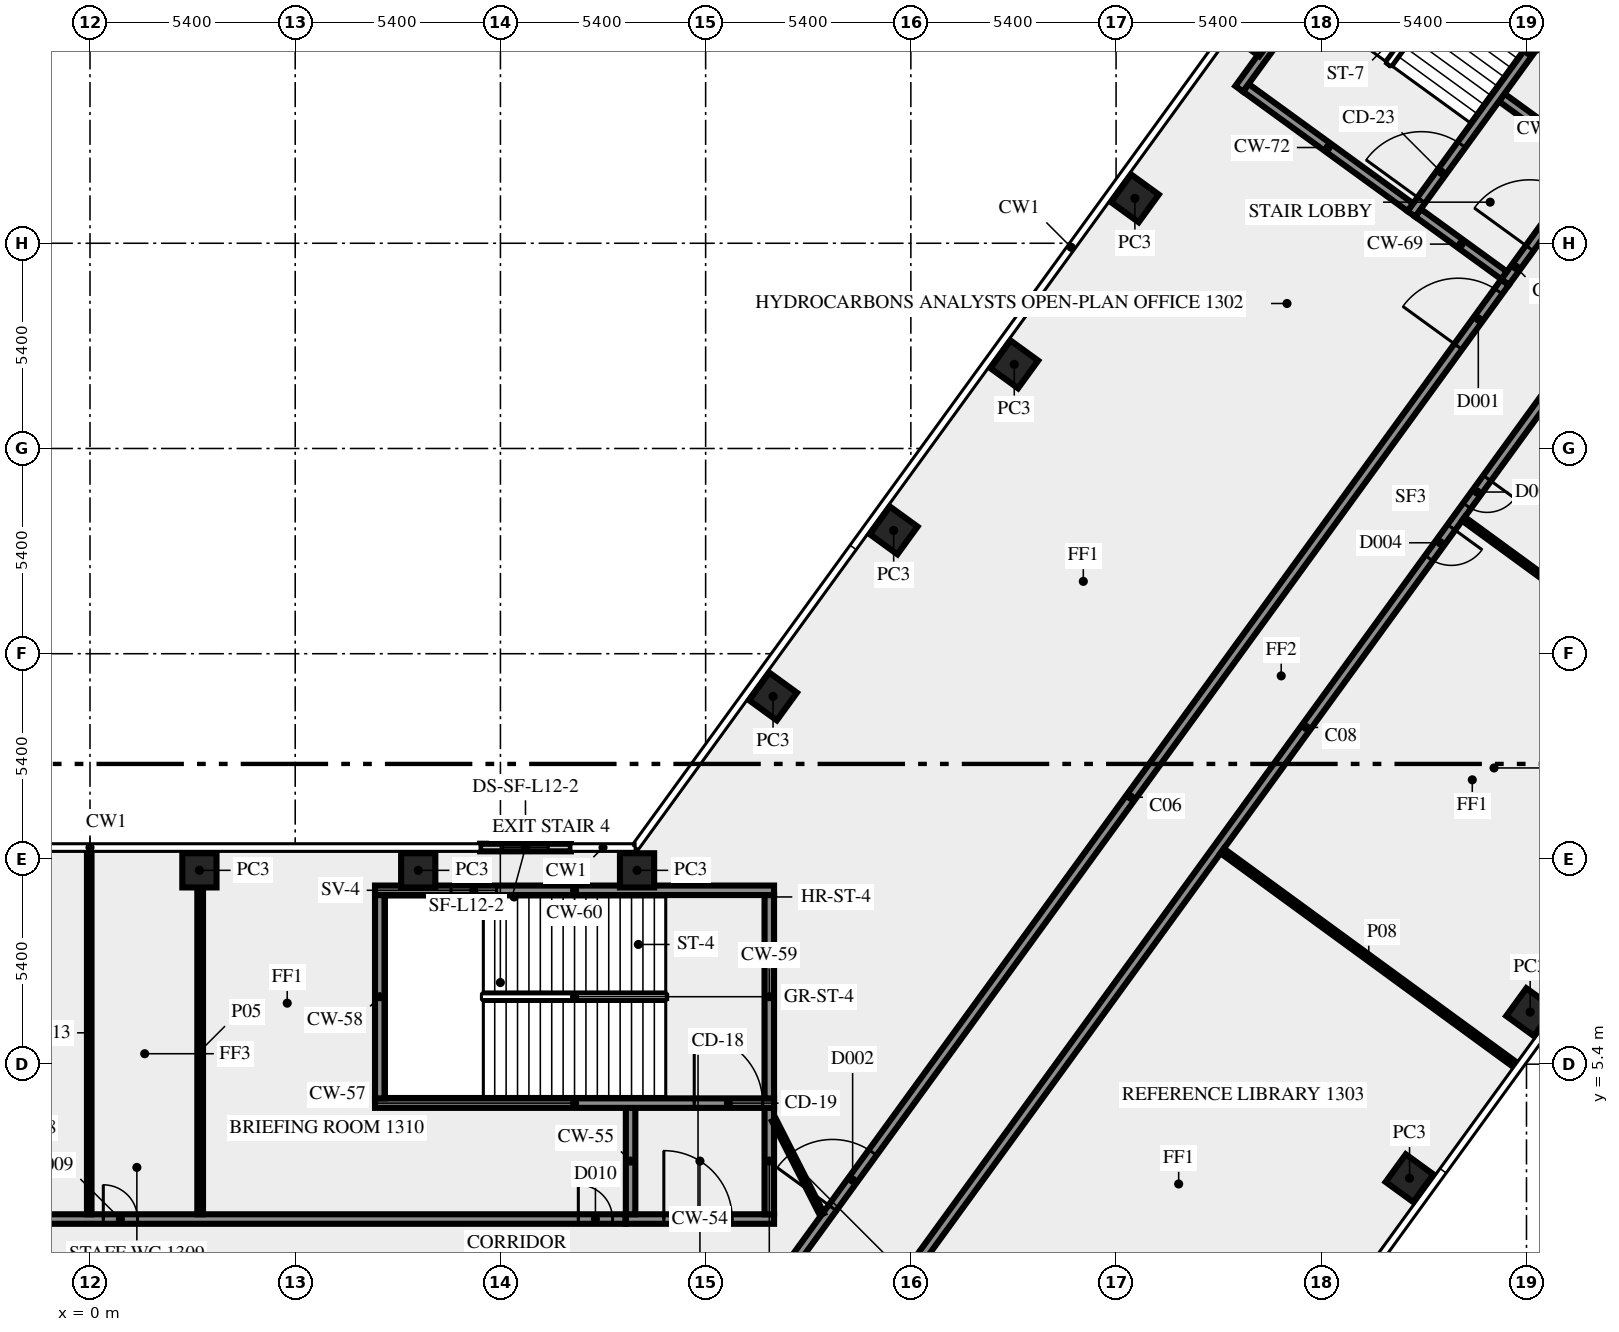
"""IFC4 building model, lengths in metres.
Left out: names, types, materials, properties, quantities, classifications, styles, units other than length and angle.
Written with IfcOpenShell. Run it as: python <this file> out.ifc"""

import sys

from ifc_helpers import new_model, si_unit, direction, frame, frame_2d, origin, origin_2d, place, context, subcontext, project, spatial, rectangle, extrude, element, fill, save


model = new_model("IFC4")
c1 = context("Model", 3, precision=1e-05, world=origin(), true_north=direction((0.0, 1.0)))
c2 = subcontext(c1, "Body", "Model", "MODEL_VIEW")
j1 = project(units=[si_unit("LENGTHUNIT", "METRE"), si_unit("PLANEANGLEUNIT", "RADIAN")], contexts=[c1])
p1 = place(None, origin())
s1 = spatial("IfcSite", under=j1, at=p1, CompositionType="ELEMENT")
p2 = place(p1, origin())
s2 = spatial("IfcBuilding", under=s1, at=p2, CompositionType="ELEMENT")
p3 = place(p2, frame((0.0, 0.0, 59.0)))
s3 = spatial("IfcBuildingStorey", under=s2, at=p3, CompositionType="ELEMENT", Elevation=59.0)
for number, where, z_axis, x_axis in (
    (1, (34.722, 2.4, 0.0), (0.0, 0.0, 1.0), (0.588, 0.809, 0.0)),
    (2, (37.896, 6.769, 0.0), (0.0, 0.0, 1.0), (0.588, 0.809, 0.0)),
    (3, (30.669, 32.55, 0.0), (0.0, 0.0, 1.0), (-0.588, -0.809, 0.0)),
    (4, (27.495, 28.181, 0.0), (0.0, 0.0, 1.0), (-0.588, -0.809, 0.0)),
    (5, (24.321, 23.812, 0.0), (0.0, 0.0, 1.0), (-0.588, -0.809, 0.0)),
    (6, (21.147, 19.444, 0.0), (0.0, 0.0, 1.0), (-0.588, -0.809, 0.0)),
    (7, (17.974, 15.075, 0.0), (0.0, 0.0, 1.0), (-0.588, -0.809, 0.0)),
    (8, (14.395, 10.5, 0.0), (0.0, 0.0, 1.0), (-1.0, 0.0, 0.0)),
    (9, (8.637, 10.5, 0.0), (0.0, 0.0, 1.0), (-1.0, 0.0, 0.0)),
    (10, (2.879, 10.5, 0.0), (0.0, 0.0, 1.0), (-1.0, 0.0, 0.0)),
):
    element("IfcColumn", number, at=place(p3, frame(where, z_axis=z_axis, x_axis=x_axis)), inside=s3, PredefinedType="COLUMN", context=c2, shape_type="SweptSolid", body=[
        extrude(rectangle(XDim=0.9, YDim=0.9, at=origin_2d()), origin(), (0.0, 0.0, 1.0), 3.65),
    ])
p4 = place(p3, frame((12.655, 11.1, 0.0), z_axis=(0.0, 0.0, 1.0), x_axis=(-1.0, 0.0, 0.0)))
e11 = element("IfcWall", 11, at=p4, inside=s3, PredefinedType="SOLIDWALL", context=c2, shape_type="SweptSolid", body=[
    extrude(rectangle(XDim=2.392, YDim=0.2, at=frame_2d((1.196, 0.0))), origin(), (0.0, 0.0, 1.0), 3.65),
])
p5 = place(p4, frame((0.596, 0.0, 1.0)))
e12 = element("IfcOpeningElement", 12, at=p5, cuts=e11, PredefinedType="OPENING", context=c2, shape_type="SweptSolid", body=[
    extrude(rectangle(XDim=1.2, YDim=1.2, at=frame_2d((0.6, 0.6))), frame((0.0, 0.11, 0.0), z_axis=(0.0, -1.0, 0.0), x_axis=(1.0, 0.0, 0.0)), (0.0, 0.0, 1.0), 0.22),
])
p6 = place(p3, frame((14.1, 1.325, 0.0), z_axis=(0.0, 0.0, 1.0), x_axis=(1.0, 0.0, 0.0)))
e13 = element("IfcWall", 13, at=p6, inside=s3, PredefinedType="SHEAR", context=c2, shape_type="SweptSolid", body=[
    extrude(rectangle(XDim=3.9, YDim=0.25, at=frame_2d((1.95, 0.0))), origin(), (0.0, 0.0, 1.0), 3.65),
])
p7 = place(p6, frame((1.0, 0.0, 0.0)))
e14 = element("IfcOpeningElement", 14, at=p7, cuts=e13, PredefinedType="OPENING", context=c2, shape_type="SweptSolid", body=[
    extrude(rectangle(XDim=1.8, YDim=2.1, at=frame_2d((0.9, 1.05))), frame((0.0, 0.135, 0.0), z_axis=(0.0, -1.0, 0.0), x_axis=(1.0, 0.0, 0.0)), (0.0, 0.0, 1.0), 0.27),
])
for number, where, z_axis, x_axis in (
    (15, (14.225, 1.45, 0.0), (0.0, 0.0, 1.0), (0.0, 1.0, 0.0)),
    (16, (17.875, 1.45, 0.0), (0.0, 0.0, 1.0), (0.0, 1.0, 0.0)),
):
    element("IfcWall", number, at=place(p3, frame(where, z_axis=z_axis, x_axis=x_axis)), inside=s3, PredefinedType="SHEAR", context=c2, shape_type="SweptSolid", body=[
        extrude(rectangle(XDim=2.8, YDim=0.25, at=frame_2d((1.4, 0.0))), origin(), (0.0, 0.0, 1.0), 3.65),
    ])
p8 = place(p3, frame((7.5, 4.375, 0.0), z_axis=(0.0, 0.0, 1.0), x_axis=(1.0, 0.0, 0.0)))
e17 = element("IfcWall", 17, at=p8, inside=s3, PredefinedType="SHEAR", context=c2, shape_type="SweptSolid", body=[
    extrude(rectangle(XDim=10.5, YDim=0.25, at=frame_2d((5.25, 0.0))), origin(), (0.0, 0.0, 1.0), 3.65),
])
p9 = place(p8, frame((8.4, 0.0, 0.0)))
e18 = element("IfcOpeningElement", 18, at=p9, cuts=e17, PredefinedType="OPENING", context=c2, shape_type="SweptSolid", body=[
    extrude(rectangle(XDim=1.8, YDim=2.1, at=frame_2d((0.9, 1.05))), frame((0.0, 0.135, 0.0), z_axis=(0.0, -1.0, 0.0), x_axis=(1.0, 0.0, 0.0)), (0.0, 0.0, 1.0), 0.27),
])
for number, where, z_axis, x_axis in (
    (19, (7.625, 4.5, 0.0), (0.0, 0.0, 1.0), (0.0, 1.0, 0.0)),
    (20, (17.875, 4.5, 0.0), (0.0, 0.0, 1.0), (0.0, 1.0, 0.0)),
):
    element("IfcWall", number, at=place(p3, frame(where, z_axis=z_axis, x_axis=x_axis)), inside=s3, PredefinedType="SHEAR", context=c2, shape_type="SweptSolid", body=[
        extrude(rectangle(XDim=5.35, YDim=0.25, at=frame_2d((2.675, 0.0))), origin(), (0.0, 0.0, 1.0), 3.65),
    ])
p10 = place(p3, frame((7.5, 9.975, 0.0), z_axis=(0.0, 0.0, 1.0), x_axis=(1.0, 0.0, 0.0)))
e21 = element("IfcWall", 21, at=p10, inside=s3, PredefinedType="SHEAR", context=c2, shape_type="SweptSolid", body=[
    extrude(rectangle(XDim=10.5, YDim=0.25, at=frame_2d((5.25, 0.0))), origin(), (0.0, 0.0, 1.0), 3.65),
])
p11 = place(p10, frame((2.0, 0.0, 1.0)))
e22 = element("IfcOpeningElement", 22, at=p11, cuts=e21, PredefinedType="OPENING", context=c2, shape_type="SweptSolid", body=[
    extrude(rectangle(XDim=1.2, YDim=1.2, at=frame_2d((0.6, 0.6))), frame((0.0, 0.135, 0.0), z_axis=(0.0, -1.0, 0.0), x_axis=(1.0, 0.0, 0.0)), (0.0, 0.0, 1.0), 0.27),
])
p12 = place(p3, frame((37.238, 25.98, 0.0), z_axis=(0.0, 0.0, 1.0), x_axis=(0.587772420479, 0.809026317077, 0.0)))
e23 = element("IfcWall", 23, at=p12, inside=s3, PredefinedType="SHEAR", context=c2, shape_type="SweptSolid", body=[
    extrude(rectangle(XDim=4.0, YDim=0.25, at=frame_2d((2.0, 0.0))), origin(), (0.0, 0.0, 1.0), 3.65),
])
p13 = place(p12, frame((1.1, 0.0, 0.0)))
e24 = element("IfcOpeningElement", 24, at=p13, cuts=e23, PredefinedType="OPENING", context=c2, shape_type="SweptSolid", body=[
    extrude(rectangle(XDim=1.8, YDim=2.1, at=frame_2d((0.9, 1.05))), frame((0.0, 0.135, 0.0), z_axis=(0.0, -1.0, 0.0), x_axis=(1.0, 0.0, 0.0)), (0.0, 0.0, 1.0), 0.27),
])
for number, where, z_axis, x_axis in (
    (25, (37.21, 26.154, 0.0), (0.0, 0.0, 1.0), (-0.809, 0.588, 0.0)),
    (26, (39.414, 29.188, 0.0), (0.0, 0.0, 1.0), (-0.809, 0.588, 0.0)),
):
    element("IfcWall", number, at=place(p3, frame(where, z_axis=z_axis, x_axis=x_axis)), inside=s3, PredefinedType="SHEAR", context=c2, shape_type="SweptSolid", body=[
        extrude(rectangle(XDim=2.8, YDim=0.25, at=frame_2d((1.4, 0.0))), origin(), (0.0, 0.0, 1.0), 3.65),
    ])
p14 = place(p3, frame((34.77, 27.772, 0.0), z_axis=(0.0, 0.0, 1.0), x_axis=(0.587795589702, 0.809009483706, 0.0)))
e27 = element("IfcWall", 27, at=p14, inside=s3, PredefinedType="SHEAR", context=c2, shape_type="SweptSolid", body=[
    extrude(rectangle(XDim=10.5, YDim=0.25, at=frame_2d((5.25, 0.0))), origin(), (0.0, 0.0, 1.0), 3.65),
])
p15 = place(p14, frame((0.45, 0.0, 0.0)))
e28 = element("IfcOpeningElement", 28, at=p15, cuts=e27, PredefinedType="OPENING", context=c2, shape_type="SweptSolid", body=[
    extrude(rectangle(XDim=1.8, YDim=2.1, at=frame_2d((0.9, 1.05))), frame((0.0, 0.135, 0.0), z_axis=(0.0, -1.0, 0.0), x_axis=(1.0, 0.0, 0.0)), (0.0, 0.0, 1.0), 0.27),
])
p16 = place(p3, frame((34.742, 27.947, 0.0), z_axis=(0.0, 0.0, 1.0), x_axis=(-0.8089984606, 0.587810760999, 0.0)))
e29 = element("IfcWall", 29, at=p16, inside=s3, PredefinedType="SHEAR", context=c2, shape_type="SweptSolid", body=[
    extrude(rectangle(XDim=5.35, YDim=0.25, at=frame_2d((2.675, 0.0))), origin(), (0.0, 0.0, 1.0), 3.65),
])
p17 = place(p3, frame((30.24, 31.064, 0.0), z_axis=(0.0, 0.0, 1.0), x_axis=(0.587795589702, 0.809009483706, 0.0)))
e30 = element("IfcWall", 30, at=p17, inside=s3, PredefinedType="SHEAR", context=c2, shape_type="SweptSolid", body=[
    extrude(rectangle(XDim=10.5, YDim=0.25, at=frame_2d((5.25, 0.0))), origin(), (0.0, 0.0, 1.0), 3.65),
])
p18 = place(p17, frame((2.15, 0.0, 1.0)))
e31 = element("IfcOpeningElement", 31, at=p18, cuts=e30, PredefinedType="OPENING", context=c2, shape_type="SweptSolid", body=[
    extrude(rectangle(XDim=1.2, YDim=1.2, at=frame_2d((0.6, 0.6))), frame((0.0, 0.135, 0.0), z_axis=(0.0, -1.0, 0.0), x_axis=(1.0, 0.0, 0.0)), (0.0, 0.0, 1.0), 0.27),
])
p19 = place(p3, frame((-14.09, 1.325, 0.0), z_axis=(0.0, 0.0, 1.0), x_axis=(1.0, 0.0, 0.0)))
e32 = element("IfcWall", 32, at=p19, inside=s3, PredefinedType="SOLIDWALL", context=c2, shape_type="SweptSolid", body=[
    extrude(rectangle(XDim=28.18, YDim=0.25, at=frame_2d((14.09, 0.0))), origin(), (0.0, 0.0, 1.0), 3.65),
])
p20 = place(p19, frame((26.94, 0.0, 0.0)))
e33 = element("IfcOpeningElement", 33, at=p20, cuts=e32, PredefinedType="OPENING", context=c2, shape_type="SweptSolid", body=[
    extrude(rectangle(XDim=0.9, YDim=2.1, at=frame_2d((0.45, 1.05))), frame((0.0, 0.135, 0.0), z_axis=(0.0, -1.0, 0.0), x_axis=(1.0, 0.0, 0.0)), (0.0, 0.0, 1.0), 0.27),
])
p21 = place(p19, frame((0.34, 0.0, 0.0)))
e34 = element("IfcOpeningElement", 34, at=p21, cuts=e32, PredefinedType="OPENING", context=c2, shape_type="SweptSolid", body=[
    extrude(rectangle(XDim=0.9, YDim=2.1, at=frame_2d((0.45, 1.05))), frame((0.0, 0.135, 0.0), z_axis=(0.0, -1.0, 0.0), x_axis=(1.0, 0.0, 0.0)), (0.0, 0.0, 1.0), 0.27),
])
p22 = place(p19, frame((14.44, 0.0, 0.0)))
e35 = element("IfcOpeningElement", 35, at=p22, cuts=e32, PredefinedType="OPENING", context=c2, shape_type="SweptSolid", body=[
    extrude(rectangle(XDim=0.9, YDim=2.1, at=frame_2d((0.45, 1.05))), frame((0.0, 0.135, 0.0), z_axis=(0.0, -1.0, 0.0), x_axis=(1.0, 0.0, 0.0)), (0.0, 0.0, 1.0), 0.27),
])
p23 = place(p3, frame((17.545, -1.125, 0.0), z_axis=(0.0, 0.0, 1.0), x_axis=(0.587786323093, 0.809016216391, 0.0)))
e36 = element("IfcWall", 36, at=p23, inside=s3, PredefinedType="SOLIDWALL", context=c2, shape_type="SweptSolid", body=[
    extrude(rectangle(XDim=33.493, YDim=0.25, at=frame_2d((16.747, 0.0))), origin(), (0.0, 0.0, 1.0), 3.65),
])
p24 = place(p23, frame((31.403, 0.0, 0.0)))
e37 = element("IfcOpeningElement", 37, at=p24, cuts=e36, PredefinedType="OPENING", context=c2, shape_type="SweptSolid", body=[
    extrude(rectangle(XDim=1.8, YDim=2.1, at=frame_2d((0.9, 1.05))), frame((0.0, 0.135, 0.0), z_axis=(0.0, -1.0, 0.0), x_axis=(1.0, 0.0, 0.0)), (0.0, 0.0, 1.0), 0.27),
])
p25 = place(p23, frame((3.392, 0.0, 0.0)))
e38 = element("IfcOpeningElement", 38, at=p25, cuts=e36, PredefinedType="OPENING", context=c2, shape_type="SweptSolid", body=[
    extrude(rectangle(XDim=1.8, YDim=2.1, at=frame_2d((0.9, 1.05))), frame((0.0, 0.135, 0.0), z_axis=(0.0, -1.0, 0.0), x_axis=(1.0, 0.0, 0.0)), (0.0, 0.0, 1.0), 0.27),
])
p26 = place(p3, frame((43.467, 30.045, 0.0), z_axis=(0.0, 0.0, 1.0), x_axis=(-0.587784726077, -0.809017376692, 0.0)))
e39 = element("IfcWall", 39, at=p26, inside=s3, PredefinedType="SOLIDWALL", context=c2, shape_type="SweptSolid", body=[
    extrude(rectangle(XDim=39.02, YDim=0.25, at=frame_2d((19.51, 0.0))), origin(), (0.0, 0.0, 1.0), 3.65),
])
p27 = place(p26, frame((11.404, 0.0, 0.0)))
e40 = element("IfcOpeningElement", 40, at=p27, cuts=e39, PredefinedType="OPENING", context=c2, shape_type="SweptSolid", body=[
    extrude(rectangle(XDim=0.9, YDim=2.1, at=frame_2d((0.45, 1.05))), frame((0.0, 0.135, 0.0), z_axis=(0.0, -1.0, 0.0), x_axis=(1.0, 0.0, 0.0)), (0.0, 0.0, 1.0), 0.27),
])
p28 = place(p26, frame((13.004, 0.0, 0.0)))
e41 = element("IfcOpeningElement", 41, at=p28, cuts=e39, PredefinedType="OPENING", context=c2, shape_type="SweptSolid", body=[
    extrude(rectangle(XDim=1.0, YDim=2.1, at=frame_2d((0.5, 1.05))), frame((0.0, 0.135, 0.0), z_axis=(0.0, -1.0, 0.0), x_axis=(1.0, 0.0, 0.0)), (0.0, 0.0, 1.0), 0.27),
])
p29 = place(p26, frame((37.287, 0.0, 0.0)))
e42 = element("IfcOpeningElement", 42, at=p29, cuts=e39, PredefinedType="OPENING", context=c2, shape_type="SweptSolid", body=[
    extrude(rectangle(XDim=1.2, YDim=2.1, at=frame_2d((0.6, 1.05))), frame((0.0, 0.135, 0.0), z_axis=(0.0, -1.0, 0.0), x_axis=(1.0, 0.0, 0.0)), (0.0, 0.0, 1.0), 0.27),
])
p30 = place(p26, frame((0.224, 0.0, 0.0)))
e43 = element("IfcOpeningElement", 43, at=p30, cuts=e39, PredefinedType="OPENING", context=c2, shape_type="SweptSolid", body=[
    extrude(rectangle(XDim=0.9, YDim=2.1, at=frame_2d((0.45, 1.05))), frame((0.0, 0.135, 0.0), z_axis=(0.0, -1.0, 0.0), x_axis=(1.0, 0.0, 0.0)), (0.0, 0.0, 1.0), 0.27),
])
p31 = place(p3, frame((2.899, 10.045, 0.0), z_axis=(0.0, 0.0, 1.0), x_axis=(0.0, -1.0, 0.0)))
e44 = element("IfcWall", 44, at=p31, inside=s3, PredefinedType="PARTITIONING", context=c2, shape_type="SweptSolid", body=[
    extrude(rectangle(XDim=8.595, YDim=0.15, at=frame_2d((4.297, 0.0))), origin(), (0.0, 0.0, 1.0), 3.65),
])
p32 = place(p3, frame((36.141, 19.749, 0.0), z_axis=(0.0, 0.0, 1.0), x_axis=(0.807691251741, -0.589605666408, 0.0)))
e45 = element("IfcWall", 45, at=p32, inside=s3, PredefinedType="PARTITIONING", context=c2, shape_type="SweptSolid", body=[
    extrude(rectangle(XDim=9.55, YDim=0.12, at=frame_2d((4.775, 0.0))), origin(), (0.0, 0.0, 1.0), 2.75),
])
p33 = place(p3, frame((29.793, 11.012, 0.0), z_axis=(0.0, 0.0, 1.0), x_axis=(0.807645841498, -0.589667868135, 0.0)))
e46 = element("IfcWall", 46, at=p33, inside=s3, PredefinedType="PARTITIONING", context=c2, shape_type="SweptSolid", body=[
    extrude(rectangle(XDim=9.551, YDim=0.15, at=frame_2d((4.775, 0.0))), origin(), (0.0, 0.0, 1.0), 2.75),
])
p34 = place(p3, frame((-0.02, 1.45, 0.0), z_axis=(0.0, 0.0, 1.0), x_axis=(0.0, 1.0, 0.0)))
e47 = element("IfcWall", 47, at=p34, inside=s3, PredefinedType="PARTITIONING", context=c2, shape_type="SweptSolid", body=[
    extrude(rectangle(XDim=9.55, YDim=0.12, at=frame_2d((4.775, 0.0))), origin(), (0.0, 0.0, 1.0), 2.75),
])
p35 = place(p3, frame((18.0, 3.925, 0.0), z_axis=(0.0, 0.0, 1.0), x_axis=(0.453950796792, -0.891026752736, 0.0)))
e48 = element("IfcWall", 48, at=p35, inside=s3, PredefinedType="PARTITIONING", context=c2, shape_type="SweptSolid", body=[
    extrude(rectangle(XDim=2.778, YDim=0.12, at=frame_2d((1.389, 0.0))), origin(), (0.0, 0.0, 1.0), 3.65),
])
p36 = place(p5, origin())
e49 = element("IfcWindow", 49, at=p36, inside=s3, PartitioningType="SINGLE_PANEL", PredefinedType="WINDOW", context=c2, shape_type="SweptSolid", body=[
    extrude(rectangle(XDim=1.2, YDim=1.2, at=frame_2d((0.6, 0.6))), frame((0.0, 0.03, 0.0), z_axis=(0.0, -1.0, 0.0), x_axis=(1.0, 0.0, 0.0)), (0.0, 0.0, 1.0), 0.06),
])
fill(e12, e49)
p37 = place(p7, origin())
e50 = element("IfcDoor", 50, at=p37, inside=s3, OperationType="DOUBLE_DOOR_SINGLE_SWING", PredefinedType="DOOR", context=c2, shape_type="SweptSolid", body=[
    extrude(rectangle(XDim=1.8, YDim=2.1, at=frame_2d((0.9, 1.05))), frame((0.0, 0.025, 0.0), z_axis=(0.0, -1.0, 0.0), x_axis=(1.0, 0.0, 0.0)), (0.0, 0.0, 1.0), 0.05),
])
fill(e14, e50)
p38 = place(p9, origin())
e51 = element("IfcDoor", 51, at=p38, inside=s3, OperationType="DOUBLE_DOOR_SINGLE_SWING", PredefinedType="DOOR", context=c2, shape_type="SweptSolid", body=[
    extrude(rectangle(XDim=1.8, YDim=2.1, at=frame_2d((0.9, 1.05))), frame((0.0, 0.025, 0.0), z_axis=(0.0, -1.0, 0.0), x_axis=(1.0, 0.0, 0.0)), (0.0, 0.0, 1.0), 0.05),
])
fill(e18, e51)
p39 = place(p11, origin())
e52 = element("IfcWindow", 52, at=p39, inside=s3, PartitioningType="SINGLE_PANEL", PredefinedType="WINDOW", context=c2, shape_type="SweptSolid", body=[
    extrude(rectangle(XDim=1.2, YDim=1.2, at=frame_2d((0.6, 0.6))), frame((0.0, 0.03, 0.0), z_axis=(0.0, -1.0, 0.0), x_axis=(1.0, 0.0, 0.0)), (0.0, 0.0, 1.0), 0.06),
])
fill(e22, e52)
p40 = place(p13, origin())
e53 = element("IfcDoor", 53, at=p40, inside=s3, OperationType="DOUBLE_DOOR_SINGLE_SWING", PredefinedType="DOOR", context=c2, shape_type="SweptSolid", body=[
    extrude(rectangle(XDim=1.8, YDim=2.1, at=frame_2d((0.9, 1.05))), frame((0.0, 0.025, 0.0), z_axis=(0.0, -1.0, 0.0), x_axis=(1.0, 0.0, 0.0)), (0.0, 0.0, 1.0), 0.05),
])
fill(e24, e53)
p41 = place(p15, origin())
e54 = element("IfcDoor", 54, at=p41, inside=s3, OperationType="DOUBLE_DOOR_SINGLE_SWING", PredefinedType="DOOR", context=c2, shape_type="SweptSolid", body=[
    extrude(rectangle(XDim=1.8, YDim=2.1, at=frame_2d((0.9, 1.05))), frame((0.0, 0.025, 0.0), z_axis=(0.0, -1.0, 0.0), x_axis=(1.0, 0.0, 0.0)), (0.0, 0.0, 1.0), 0.05),
])
fill(e28, e54)
p42 = place(p24, origin())
e55 = element("IfcDoor", 55, at=p42, inside=s3, OperationType="DOUBLE_DOOR_SINGLE_SWING", PredefinedType="DOOR", context=c2, shape_type="SweptSolid", body=[
    extrude(rectangle(XDim=1.8, YDim=2.1, at=frame_2d((0.9, 1.05))), frame((0.0, 0.025, 0.0), z_axis=(0.0, -1.0, 0.0), x_axis=(1.0, 0.0, 0.0)), (0.0, 0.0, 1.0), 0.05),
])
fill(e37, e55)
p43 = place(p25, origin())
e56 = element("IfcDoor", 56, at=p43, inside=s3, OperationType="DOUBLE_DOOR_SINGLE_SWING", PredefinedType="DOOR", context=c2, shape_type="SweptSolid", body=[
    extrude(rectangle(XDim=1.8, YDim=2.1, at=frame_2d((0.9, 1.05))), frame((0.0, 0.025, 0.0), z_axis=(0.0, -1.0, 0.0), x_axis=(1.0, 0.0, 0.0)), (0.0, 0.0, 1.0), 0.05),
])
fill(e38, e56)
p44 = place(p20, origin())
e57 = element("IfcDoor", 57, at=p44, inside=s3, OperationType="SINGLE_SWING_RIGHT", PredefinedType="DOOR", context=c2, shape_type="SweptSolid", body=[
    extrude(rectangle(XDim=0.9, YDim=2.1, at=frame_2d((0.45, 1.05))), frame((0.0, 0.025, 0.0), z_axis=(0.0, -1.0, 0.0), x_axis=(1.0, 0.0, 0.0)), (0.0, 0.0, 1.0), 0.05),
])
fill(e33, e57)
p45 = place(p27, origin())
e58 = element("IfcDoor", 58, at=p45, inside=s3, OperationType="SINGLE_SWING_RIGHT", PredefinedType="DOOR", context=c2, shape_type="SweptSolid", body=[
    extrude(rectangle(XDim=0.9, YDim=2.1, at=frame_2d((0.45, 1.05))), frame((0.0, 0.025, 0.0), z_axis=(0.0, -1.0, 0.0), x_axis=(1.0, 0.0, 0.0)), (0.0, 0.0, 1.0), 0.05),
])
fill(e40, e58)
p46 = place(p28, origin())
e59 = element("IfcDoor", 59, at=p46, inside=s3, OperationType="SINGLE_SWING_LEFT", PredefinedType="DOOR", context=c2, shape_type="SweptSolid", body=[
    extrude(rectangle(XDim=1.0, YDim=2.1, at=frame_2d((0.5, 1.05))), frame((0.0, 0.025, 0.0), z_axis=(0.0, -1.0, 0.0), x_axis=(1.0, 0.0, 0.0)), (0.0, 0.0, 1.0), 0.05),
])
fill(e41, e59)
p47 = place(p22, origin())
e60 = element("IfcDoor", 60, at=p47, inside=s3, OperationType="SINGLE_SWING_LEFT", PredefinedType="DOOR", context=c2, shape_type="SweptSolid", body=[
    extrude(rectangle(XDim=0.9, YDim=2.1, at=frame_2d((0.45, 1.05))), frame((0.0, 0.025, 0.0), z_axis=(0.0, -1.0, 0.0), x_axis=(1.0, 0.0, 0.0)), (0.0, 0.0, 1.0), 0.05),
])
fill(e35, e60)
save(model, sys.argv[1])
